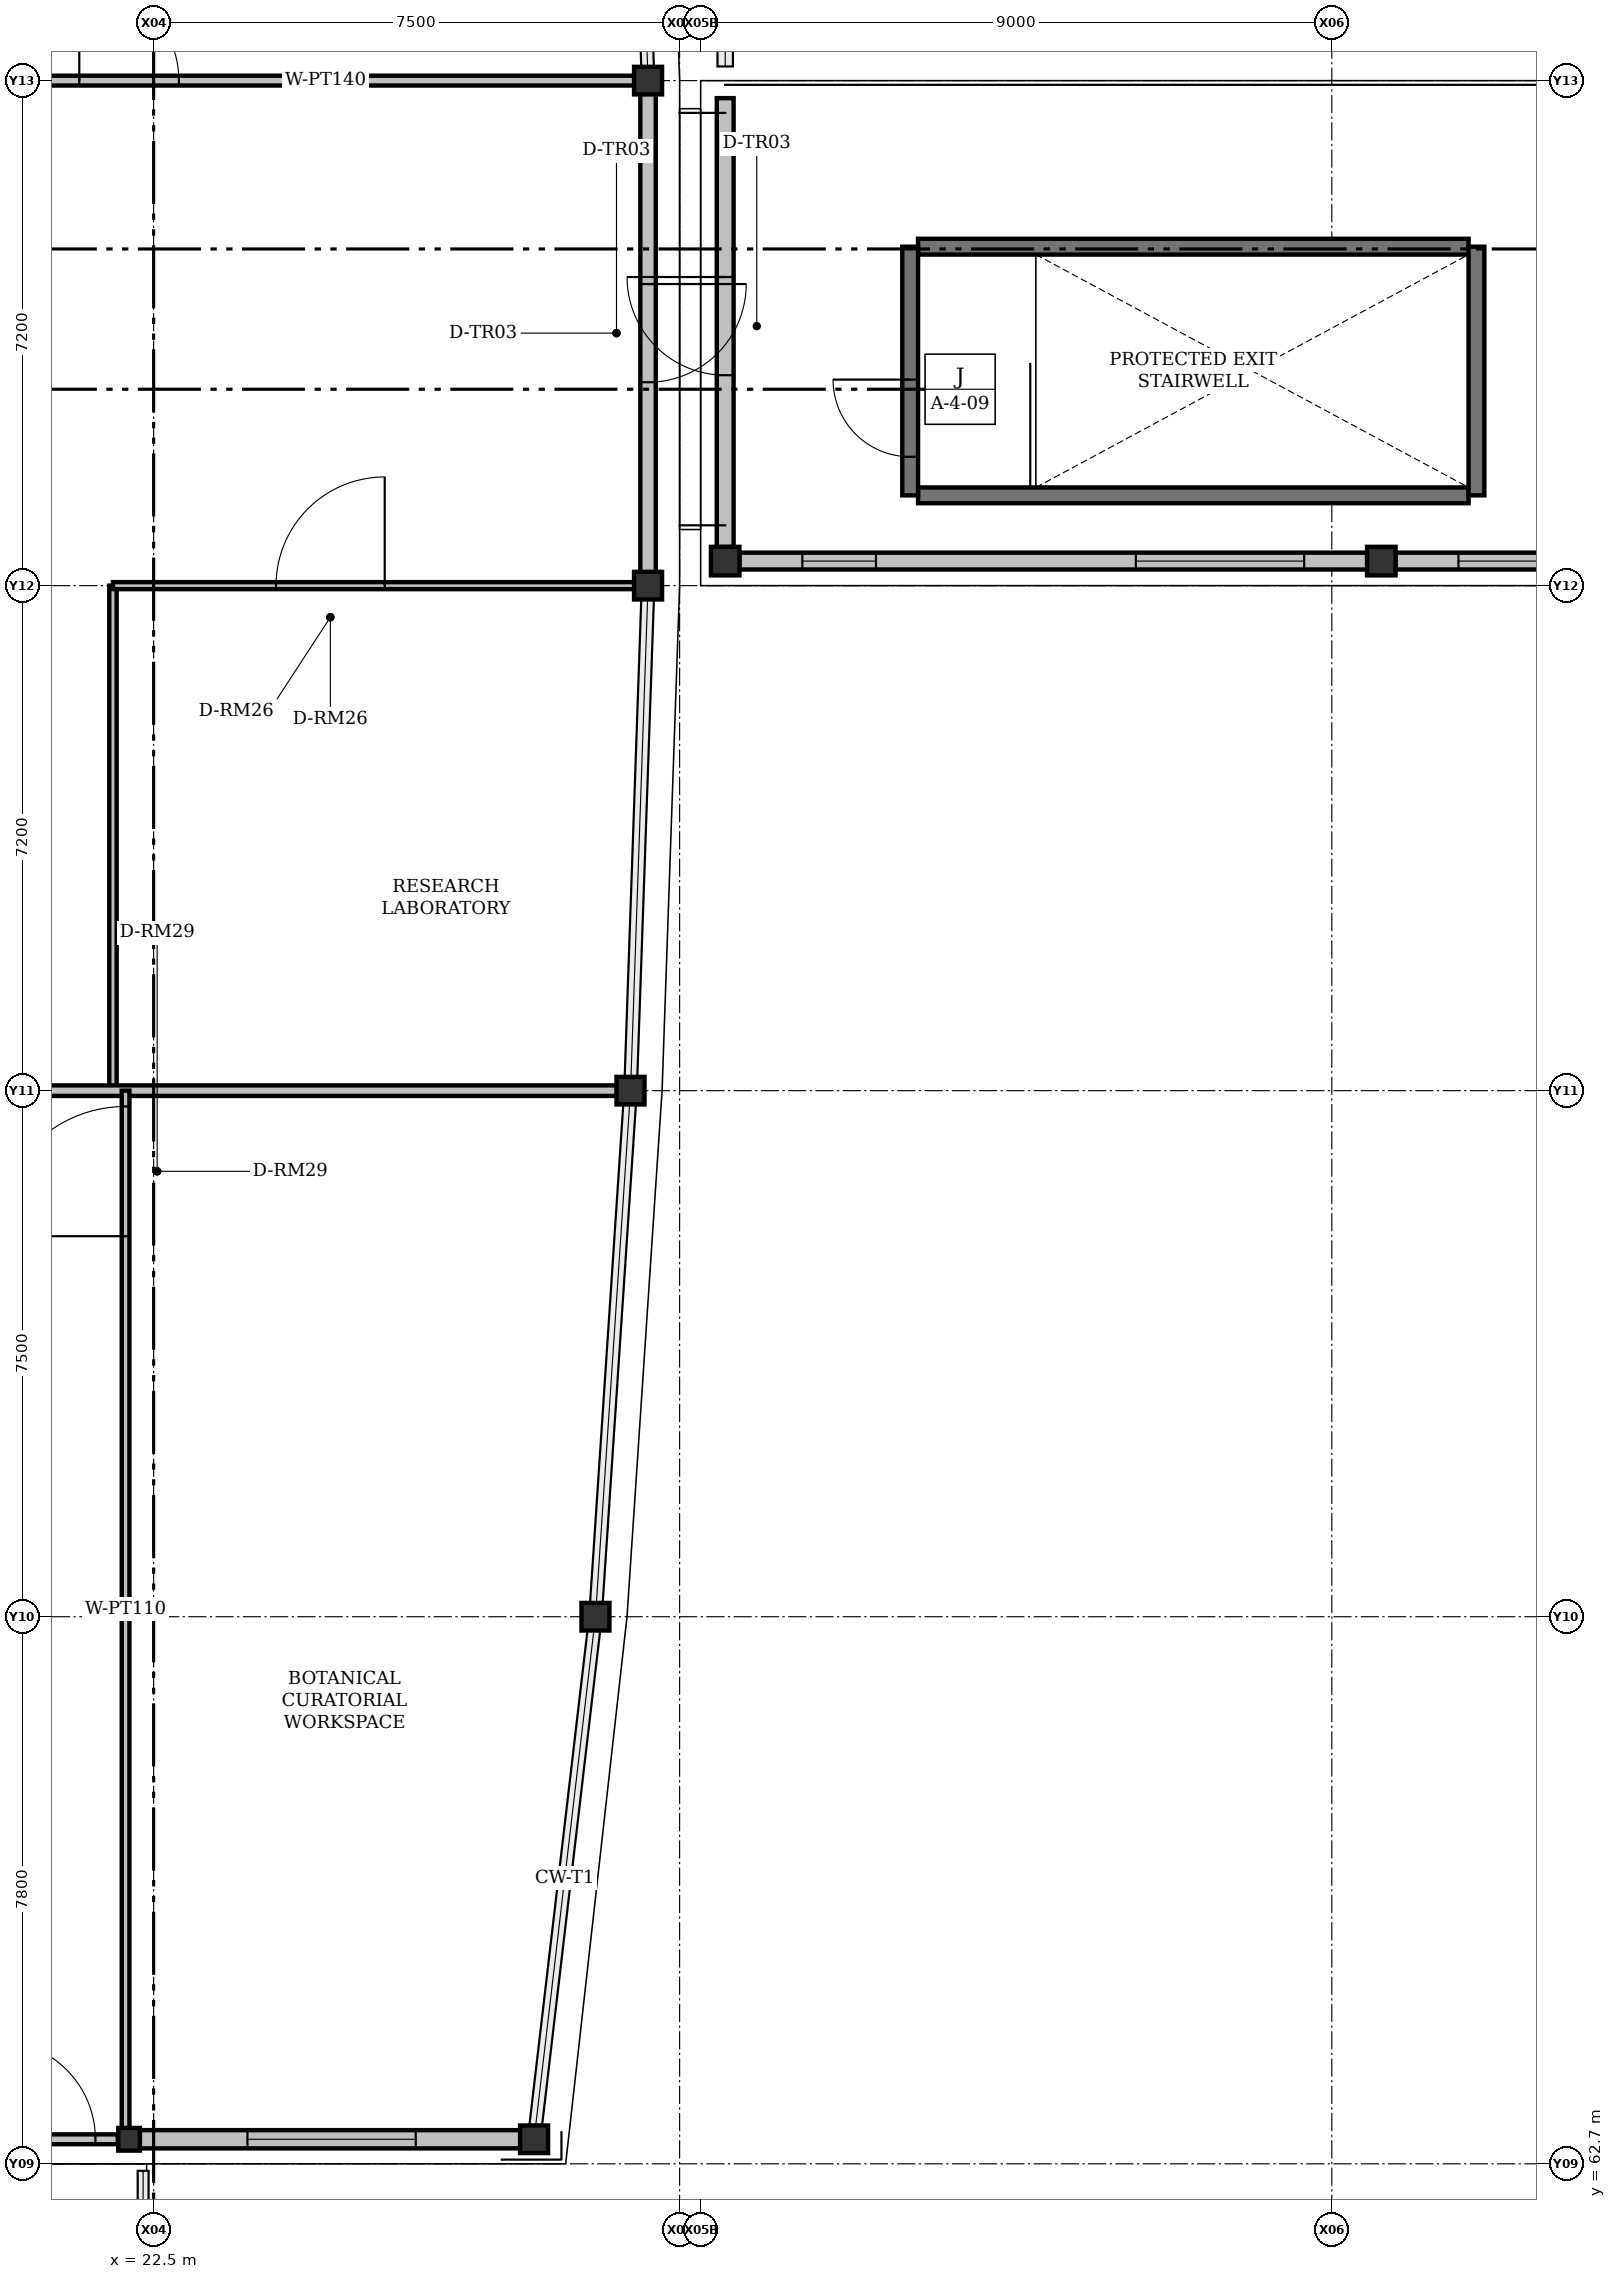
"""IFC4 building model, lengths in metres.
Left out: names, types, materials, properties, quantities, classifications, styles, units other than length and angle.
Written with IfcOpenShell. Run it as: python <this file> out.ifc"""

import sys

from ifc_helpers import new_model, si_unit, direction, frame, frame_2d, origin, origin_2d, place, context, subcontext, project, spatial, rectangle, hollow_circle, i_section, extrude, element, fill, save


model = new_model("IFC4")
c1 = context("Model", 3, precision=1e-05, world=origin(), true_north=direction((0.0, 1.0)))
c2 = subcontext(c1, "Body", "Model", "MODEL_VIEW")
j1 = project(units=[si_unit("LENGTHUNIT", "METRE"), si_unit("PLANEANGLEUNIT", "RADIAN")], contexts=[c1])
p1 = place(None, origin())
s1 = spatial("IfcSite", under=j1, at=p1, CompositionType="ELEMENT")
p2 = place(p1, origin())
s2 = spatial("IfcBuilding", under=s1, at=p2, CompositionType="ELEMENT")
p3 = place(p2, frame((0.0, 0.0, 5.4)))
s3 = spatial("IfcBuildingStorey", under=s2, at=p3, CompositionType="ELEMENT", Elevation=5.4)
for number, where, z_axis, x_axis in (
    (1, (27.925, 63.05, 0.0), (0.0, 0.0, 1.0), (1.0, 0.0, 0.0)),
    (2, (28.8, 70.5, 0.0), (0.0, 0.0, 1.0), (1.0, 0.0, 0.0)),
    (3, (29.3, 78.0, 0.0), (0.0, 0.0, 1.0), (1.0, 0.0, 0.0)),
    (4, (29.55, 85.2, 0.0), (0.0, 0.0, 1.0), (1.0, 0.0, 0.0)),
    (5, (29.55, 92.4, 0.0), (0.0, 0.0, 1.0), (1.0, 0.0, 0.0)),
):
    element("IfcColumn", number, at=place(p3, frame(where, z_axis=z_axis, x_axis=x_axis)), inside=s3, PredefinedType="COLUMN", context=c2, shape_type="SweptSolid", body=[
        extrude(i_section(OverallWidth=0.399, OverallDepth=0.393, WebThickness=0.023, FlangeThickness=0.036, FilletRadius=0.015, at=origin_2d()), origin(), (0.0, 0.0, 1.0), 4.5),
    ])
p4 = place(p3, frame((30.65, 85.55, 0.0), z_axis=(0.0, 0.0, 1.0), x_axis=(1.0, 0.0, 0.0)))
e6 = element("IfcColumn", 6, at=p4, inside=s3, PredefinedType="COLUMN", context=c2, shape_type="SweptSolid", body=[
    extrude(hollow_circle(Radius=0.203, WallThickness=0.016, at=origin_2d()), origin(), (0.0, 0.0, 1.0), 6.966),
])
p5 = place(p3, frame((40.006, 85.55, 0.0), z_axis=(0.0, 0.0, 1.0), x_axis=(1.0, 0.0, 0.0)))
e7 = element("IfcColumn", 7, at=p5, inside=s3, PredefinedType="COLUMN", context=c2, shape_type="SweptSolid", body=[
    extrude(hollow_circle(Radius=0.203, WallThickness=0.016, at=origin_2d()), origin(), (0.0, 0.0, 1.0), 7.9),
])
p6 = place(p3, frame((22.15, 63.05, 0.0), z_axis=(0.0, 0.0, 1.0), x_axis=(1.0, 0.0, 0.0)))
e8 = element("IfcColumn", 8, at=p6, inside=s3, PredefinedType="COLUMN", context=c2, shape_type="SweptSolid", body=[
    extrude(i_section(OverallWidth=0.309, OverallDepth=0.323, WebThickness=0.014, FlangeThickness=0.023, FilletRadius=0.015, at=origin_2d()), origin(), (0.0, 0.0, 1.0), 4.5),
])
p7 = place(p3, frame((27.925, 63.05, 0.0), z_axis=(0.0, 0.0, 1.0), x_axis=(-1.0, 0.0, 0.0)))
e9 = element("IfcWall", 9, at=p7, inside=s3, PredefinedType="SOLIDWALL", context=c2, shape_type="SweptSolid", body=[
    extrude(rectangle(XDim=5.775, YDim=0.26, at=frame_2d((2.888, 0.0))), origin(), (0.0, 0.0, 1.0), 3.847),
])
p8 = place(p7, frame((1.688, 0.0, 0.92)))
e10 = element("IfcOpeningElement", 10, at=p8, cuts=e9, PredefinedType="OPENING", context=c2, shape_type="SweptSolid", body=[
    extrude(rectangle(XDim=2.4, YDim=1.55, at=frame_2d((1.2, 0.775))), frame((0.0, 0.13, 0.0), z_axis=(0.0, -1.0, 0.0), x_axis=(1.0, 0.0, 0.0)), (0.0, 0.0, 1.0), 0.26),
])
p9 = place(p3, frame((29.55, 92.4, 0.0), z_axis=(0.0, 0.0, 1.0), x_axis=(0.0, -1.0, 0.0)))
e11 = element("IfcWall", 11, at=p9, inside=s3, PredefinedType="SOLIDWALL", context=c2, shape_type="SweptSolid", body=[
    extrude(rectangle(XDim=7.2, YDim=0.22, at=frame_2d((3.6, 0.0))), origin(), (0.0, 0.0, 1.0), 3.847),
])
p10 = place(p9, frame((2.9, 0.0, 0.0)))
e12 = element("IfcOpeningElement", 12, at=p10, cuts=e11, PredefinedType="OPENING", context=c2, shape_type="SweptSolid", body=[
    extrude(rectangle(XDim=1.4, YDim=2.2, at=frame_2d((0.7, 1.1))), frame((0.0, 0.11, 0.0), z_axis=(0.0, -1.0, 0.0), x_axis=(1.0, 0.0, 0.0)), (0.0, 0.0, 1.0), 0.22),
])
p11 = place(p3, frame((39.804, 85.55, 0.0), z_axis=(0.0, 0.0, 1.0), x_axis=(-1.0, 0.0, 0.0)))
e13 = element("IfcWall", 13, at=p11, inside=s3, PredefinedType="SOLIDWALL", context=c2, shape_type="SweptSolid", body=[
    extrude(rectangle(XDim=8.953, YDim=0.24, at=frame_2d((4.477, 0.0))), origin(), (0.0, 0.0, 1.0), 5.2),
])
p12 = place(p11, frame((0.899, 0.0, 0.92)))
e14 = element("IfcOpeningElement", 14, at=p12, cuts=e13, PredefinedType="OPENING", context=c2, shape_type="SweptSolid", body=[
    extrude(rectangle(XDim=2.4, YDim=1.55, at=frame_2d((1.2, 0.775))), frame((0.0, 0.12, 0.0), z_axis=(0.0, -1.0, 0.0), x_axis=(1.0, 0.0, 0.0)), (0.0, 0.0, 1.0), 0.24),
])
p13 = place(p11, frame((7.004, 0.0, 0.92)))
e15 = element("IfcOpeningElement", 15, at=p13, cuts=e13, PredefinedType="OPENING", context=c2, shape_type="SweptSolid", body=[
    extrude(rectangle(XDim=1.05, YDim=1.3, at=frame_2d((0.525, 0.65))), frame((0.0, 0.12, 0.0), z_axis=(0.0, -1.0, 0.0), x_axis=(1.0, 0.0, 0.0)), (0.0, 0.0, 1.0), 0.24),
])
p14 = place(p3, frame((49.16, 85.55, 0.0), z_axis=(0.0, 0.0, 1.0), x_axis=(-1.0, 0.0, 0.0)))
e16 = element("IfcWall", 16, at=p14, inside=s3, PredefinedType="SOLIDWALL", context=c2, shape_type="SweptSolid", body=[
    extrude(rectangle(XDim=8.953, YDim=0.24, at=frame_2d((4.477, 0.0))), origin(), (0.0, 0.0, 1.0), 5.2),
])
p15 = place(p14, frame((0.899, 0.0, 0.92)))
e17 = element("IfcOpeningElement", 17, at=p15, cuts=e16, PredefinedType="OPENING", context=c2, shape_type="SweptSolid", body=[
    extrude(rectangle(XDim=1.2, YDim=1.7, at=frame_2d((0.6, 0.85))), frame((0.0, 0.12, 0.0), z_axis=(0.0, -1.0, 0.0), x_axis=(1.0, 0.0, 0.0)), (0.0, 0.0, 1.0), 0.24),
])
p16 = place(p14, frame((6.454, 0.0, 0.92)))
e18 = element("IfcOpeningElement", 18, at=p16, cuts=e16, PredefinedType="OPENING", context=c2, shape_type="SweptSolid", body=[
    extrude(rectangle(XDim=1.6, YDim=1.35, at=frame_2d((0.8, 0.675))), frame((0.0, 0.12, 0.0), z_axis=(0.0, -1.0, 0.0), x_axis=(1.0, 0.0, 0.0)), (0.0, 0.0, 1.0), 0.24),
])
p17 = place(p3, frame((30.65, 85.751, 0.0), z_axis=(0.0, 0.0, 1.0), x_axis=(0.0, 1.0, 0.0)))
e19 = element("IfcWall", 19, at=p17, inside=s3, PredefinedType="SOLIDWALL", context=c2, shape_type="SweptSolid", body=[
    extrude(rectangle(XDim=6.399, YDim=0.24, at=frame_2d((3.199, 0.0))), origin(), (0.0, 0.0, 1.0), 5.5),
])
p18 = place(p17, frame((2.449, 0.0, 0.0)))
e20 = element("IfcOpeningElement", 20, at=p18, cuts=e19, PredefinedType="OPENING", context=c2, shape_type="SweptSolid", body=[
    extrude(rectangle(XDim=1.4, YDim=2.2, at=frame_2d((0.7, 1.1))), frame((0.0, 0.12, 0.0), z_axis=(0.0, -1.0, 0.0), x_axis=(1.0, 0.0, 0.0)), (0.0, 0.0, 1.0), 0.24),
])
for number, where, z_axis, x_axis in (
    (21, (33.4, 86.488, 0.0), (0.0, 0.0, 1.0), (1.0, 0.0, 0.0)),
    (22, (33.4, 90.032, 0.0), (0.0, 0.0, 1.0), (1.0, 0.0, 0.0)),
):
    element("IfcWall", number, at=place(p3, frame(where, z_axis=z_axis, x_axis=x_axis)), inside=s3, PredefinedType="SHEAR", context=c2, shape_type="SweptSolid", body=[
        extrude(rectangle(XDim=7.85, YDim=0.225, at=frame_2d((3.925, 0.0))), origin(), (0.0, 0.0, 1.0), 4.0),
    ])
p19 = place(p3, frame((41.363, 86.488, 0.0), z_axis=(0.0, 0.0, 1.0), x_axis=(0.0, 1.0, 0.0)))
e23 = element("IfcWall", 23, at=p19, inside=s3, PredefinedType="SHEAR", context=c2, shape_type="SweptSolid", body=[
    extrude(rectangle(XDim=3.545, YDim=0.225, at=frame_2d((1.772, 0.0))), origin(), (0.0, 0.0, 1.0), 4.0),
])
p20 = place(p3, frame((33.288, 86.488, 0.0), z_axis=(0.0, 0.0, 1.0), x_axis=(0.0, 1.0, 0.0)))
e24 = element("IfcWall", 24, at=p20, inside=s3, PredefinedType="SHEAR", context=c2, shape_type="SweptSolid", body=[
    extrude(rectangle(XDim=3.545, YDim=0.225, at=frame_2d((1.772, 0.0))), origin(), (0.0, 0.0, 1.0), 4.0),
])
p21 = place(p20, frame((0.55, 0.0, 0.0)))
e25 = element("IfcOpeningElement", 25, at=p21, cuts=e24, PredefinedType="OPENING", context=c2, shape_type="SweptSolid", body=[
    extrude(rectangle(XDim=1.1, YDim=2.15, at=frame_2d((0.55, 1.075))), frame((0.0, 0.113, 0.0), z_axis=(0.0, -1.0, 0.0), x_axis=(1.0, 0.0, 0.0)), (0.0, 0.0, 1.0), 0.225),
])
p22 = place(p3, frame((19.945, 92.4, 0.0), z_axis=(0.0, 0.0, 1.0), x_axis=(1.0, 0.0, 0.0)))
e26 = element("IfcWall", 26, at=p22, inside=s3, PredefinedType="PARTITIONING", context=c2, shape_type="SweptSolid", body=[
    extrude(rectangle(XDim=9.411, YDim=0.14, at=frame_2d((4.706, 0.0))), origin(), (0.0, 0.0, 1.0), 3.721),
])
p23 = place(p22, frame((1.496, 0.0, 0.0)))
e27 = element("IfcOpeningElement", 27, at=p23, cuts=e26, PredefinedType="OPENING", context=c2, shape_type="SweptSolid", body=[
    extrude(rectangle(XDim=1.42, YDim=2.3, at=frame_2d((0.71, 1.15))), frame((0.0, 0.07, 0.0), z_axis=(0.0, -1.0, 0.0), x_axis=(1.0, 0.0, 0.0)), (0.0, 0.0, 1.0), 0.14),
])
p24 = place(p3, frame((21.92, 78.0, 0.0), z_axis=(0.0, 0.0, 1.0), x_axis=(0.0, 1.0, 0.0)))
e28 = element("IfcWall", 28, at=p24, inside=s3, PredefinedType="PARTITIONING", context=c2, shape_type="SweptSolid", body=[
    extrude(rectangle(XDim=7.2, YDim=0.105, at=frame_2d((3.6, 0.0))), origin(), (0.0, 0.0, 1.0), 3.721),
])
p25 = place(p3, frame((21.92, 85.2, 0.0), z_axis=(0.0, 0.0, 1.0), x_axis=(1.0, 0.0, 0.0)))
e29 = element("IfcWall", 29, at=p25, inside=s3, PredefinedType="PARTITIONING", context=c2, shape_type="SweptSolid", body=[
    extrude(rectangle(XDim=7.436, YDim=0.1, at=frame_2d((3.718, 0.0))), origin(), (0.0, 0.0, 1.0), 3.721),
])
p26 = place(p25, frame((2.325, 0.0, 0.0)))
e30 = element("IfcOpeningElement", 30, at=p26, cuts=e29, PredefinedType="OPENING", context=c2, shape_type="SweptSolid", body=[
    extrude(rectangle(XDim=1.55, YDim=2.3, at=frame_2d((0.775, 1.15))), frame((0.0, 0.05, 0.0), z_axis=(0.0, -1.0, 0.0), x_axis=(1.0, 0.0, 0.0)), (0.0, 0.0, 1.0), 0.1),
])
p27 = place(p3, frame((29.105, 78.0, 0.0), z_axis=(0.0, 0.0, 1.0), x_axis=(-1.0, 0.0, 0.0)))
e31 = element("IfcWall", 31, at=p27, inside=s3, PredefinedType="PARTITIONING", context=c2, shape_type="SweptSolid", body=[
    extrude(rectangle(XDim=9.161, YDim=0.15, at=frame_2d((4.581, 0.0))), origin(), (0.0, 0.0, 1.0), 3.721),
])
p28 = place(p3, frame((19.95, 63.05, 0.0), z_axis=(0.0, 0.0, 1.0), x_axis=(1.0, 0.0, 0.0)))
e32 = element("IfcWall", 32, at=p28, inside=s3, PredefinedType="PARTITIONING", context=c2, shape_type="SweptSolid", body=[
    extrude(rectangle(XDim=2.04, YDim=0.14, at=frame_2d((1.02, 0.0))), origin(), (0.0, 0.0, 1.0), 3.847),
])
p29 = place(p28, frame((0.32, 0.0, 0.0)))
e33 = element("IfcOpeningElement", 33, at=p29, cuts=e32, PredefinedType="OPENING", context=c2, shape_type="SweptSolid", body=[
    extrude(rectangle(XDim=1.4, YDim=2.25, at=frame_2d((0.7, 1.125))), frame((0.0, 0.07, 0.0), z_axis=(0.0, -1.0, 0.0), x_axis=(1.0, 0.0, 0.0)), (0.0, 0.0, 1.0), 0.14),
])
p30 = place(p3, frame((22.1, 63.207, 0.0), z_axis=(0.0, 0.0, 1.0), x_axis=(0.0, 1.0, 0.0)))
e34 = element("IfcWall", 34, at=p30, inside=s3, PredefinedType="PARTITIONING", context=c2, shape_type="SweptSolid", body=[
    extrude(rectangle(XDim=14.793, YDim=0.11, at=frame_2d((7.397, 0.0))), origin(), (0.0, 0.0, 1.0), 2.86),
])
p31 = place(p30, frame((12.719, 0.0, 0.0)))
e35 = element("IfcOpeningElement", 35, at=p31, cuts=e34, PredefinedType="OPENING", context=c2, shape_type="SweptSolid", body=[
    extrude(rectangle(XDim=1.85, YDim=2.35, at=frame_2d((0.925, 1.175))), frame((0.0, 0.055, 0.0), z_axis=(0.0, -1.0, 0.0), x_axis=(1.0, 0.0, 0.0)), (0.0, 0.0, 1.0), 0.11),
])
p32 = place(p8, origin())
e36 = element("IfcWindow", 36, at=p32, inside=s3, PartitioningType="DOUBLE_PANEL_VERTICAL", PredefinedType="WINDOW", context=c2, shape_type="SweptSolid", body=[
    extrude(rectangle(XDim=2.4, YDim=1.55, at=frame_2d((1.2, 0.775))), frame((0.0, 0.03, 0.0), z_axis=(0.0, -1.0, 0.0), x_axis=(1.0, 0.0, 0.0)), (0.0, 0.0, 1.0), 0.06),
])
fill(e10, e36)
p33 = place(p10, origin())
e37 = element("IfcDoor", 37, at=p33, inside=s3, OperationType="SINGLE_SWING_LEFT", PredefinedType="DOOR", context=c2, shape_type="SweptSolid", body=[
    extrude(rectangle(XDim=1.4, YDim=2.2, at=frame_2d((0.7, 1.1))), frame((0.0, 0.025, 0.0), z_axis=(0.0, -1.0, 0.0), x_axis=(1.0, 0.0, 0.0)), (0.0, 0.0, 1.0), 0.05),
])
fill(e12, e37)
p34 = place(p12, origin())
e38 = element("IfcWindow", 38, at=p34, inside=s3, PartitioningType="DOUBLE_PANEL_VERTICAL", PredefinedType="WINDOW", context=c2, shape_type="SweptSolid", body=[
    extrude(rectangle(XDim=2.4, YDim=1.55, at=frame_2d((1.2, 0.775))), frame((0.0, 0.03, 0.0), z_axis=(0.0, -1.0, 0.0), x_axis=(1.0, 0.0, 0.0)), (0.0, 0.0, 1.0), 0.06),
])
fill(e14, e38)
p35 = place(p13, origin())
e39 = element("IfcWindow", 39, at=p35, inside=s3, PartitioningType="SINGLE_PANEL", PredefinedType="WINDOW", context=c2, shape_type="SweptSolid", body=[
    extrude(rectangle(XDim=1.05, YDim=1.3, at=frame_2d((0.525, 0.65))), frame((0.0, 0.03, 0.0), z_axis=(0.0, -1.0, 0.0), x_axis=(1.0, 0.0, 0.0)), (0.0, 0.0, 1.0), 0.06),
])
fill(e15, e39)
p36 = place(p16, origin())
e40 = element("IfcWindow", 40, at=p36, inside=s3, PartitioningType="DOUBLE_PANEL_VERTICAL", PredefinedType="WINDOW", context=c2, shape_type="SweptSolid", body=[
    extrude(rectangle(XDim=1.6, YDim=1.35, at=frame_2d((0.8, 0.675))), frame((0.0, 0.03, 0.0), z_axis=(0.0, -1.0, 0.0), x_axis=(1.0, 0.0, 0.0)), (0.0, 0.0, 1.0), 0.06),
])
fill(e18, e40)
p37 = place(p18, origin())
e41 = element("IfcDoor", 41, at=p37, inside=s3, OperationType="SINGLE_SWING_RIGHT", PredefinedType="DOOR", context=c2, shape_type="SweptSolid", body=[
    extrude(rectangle(XDim=1.4, YDim=2.2, at=frame_2d((0.7, 1.1))), frame((0.0, 0.025, 0.0), z_axis=(0.0, -1.0, 0.0), x_axis=(1.0, 0.0, 0.0)), (0.0, 0.0, 1.0), 0.05),
])
fill(e20, e41)
p38 = place(p21, origin())
e42 = element("IfcDoor", 42, at=p38, inside=s3, OperationType="SINGLE_SWING_RIGHT", PredefinedType="DOOR", context=c2, shape_type="SweptSolid", body=[
    extrude(rectangle(XDim=1.1, YDim=2.15, at=frame_2d((0.55, 1.075))), frame((0.0, 0.025, 0.0), z_axis=(0.0, -1.0, 0.0), x_axis=(1.0, 0.0, 0.0)), (0.0, 0.0, 1.0), 0.05),
])
fill(e25, e42)
p39 = place(p23, origin())
e43 = element("IfcDoor", 43, at=p39, inside=s3, OperationType="SINGLE_SWING_LEFT", PredefinedType="DOOR", context=c2, shape_type="SweptSolid", body=[
    extrude(rectangle(XDim=1.42, YDim=2.3, at=frame_2d((0.71, 1.15))), frame((0.0, 0.025, 0.0), z_axis=(0.0, -1.0, 0.0), x_axis=(1.0, 0.0, 0.0)), (0.0, 0.0, 1.0), 0.05),
])
fill(e27, e43)
p40 = place(p26, origin())
e44 = element("IfcDoor", 44, at=p40, inside=s3, OperationType="SINGLE_SWING_RIGHT", PredefinedType="DOOR", context=c2, shape_type="SweptSolid", body=[
    extrude(rectangle(XDim=1.55, YDim=2.3, at=frame_2d((0.775, 1.15))), frame((0.0, 0.025, 0.0), z_axis=(0.0, -1.0, 0.0), x_axis=(1.0, 0.0, 0.0)), (0.0, 0.0, 1.0), 0.05),
])
fill(e30, e44)
p41 = place(p29, origin())
e45 = element("IfcDoor", 45, at=p41, inside=s3, OperationType="SINGLE_SWING_LEFT", PredefinedType="DOOR", context=c2, shape_type="SweptSolid", body=[
    extrude(rectangle(XDim=1.4, YDim=2.25, at=frame_2d((0.7, 1.125))), frame((0.0, 0.025, 0.0), z_axis=(0.0, -1.0, 0.0), x_axis=(1.0, 0.0, 0.0)), (0.0, 0.0, 1.0), 0.05),
])
fill(e33, e45)
p42 = place(p31, origin())
e46 = element("IfcDoor", 46, at=p42, inside=s3, OperationType="SINGLE_SWING_LEFT", PredefinedType="DOOR", context=c2, shape_type="SweptSolid", body=[
    extrude(rectangle(XDim=1.85, YDim=2.35, at=frame_2d((0.925, 1.175))), frame((0.0, 0.025, 0.0), z_axis=(0.0, -1.0, 0.0), x_axis=(1.0, 0.0, 0.0)), (0.0, 0.0, 1.0), 0.05),
])
fill(e35, e46)
save(model, sys.argv[1])
